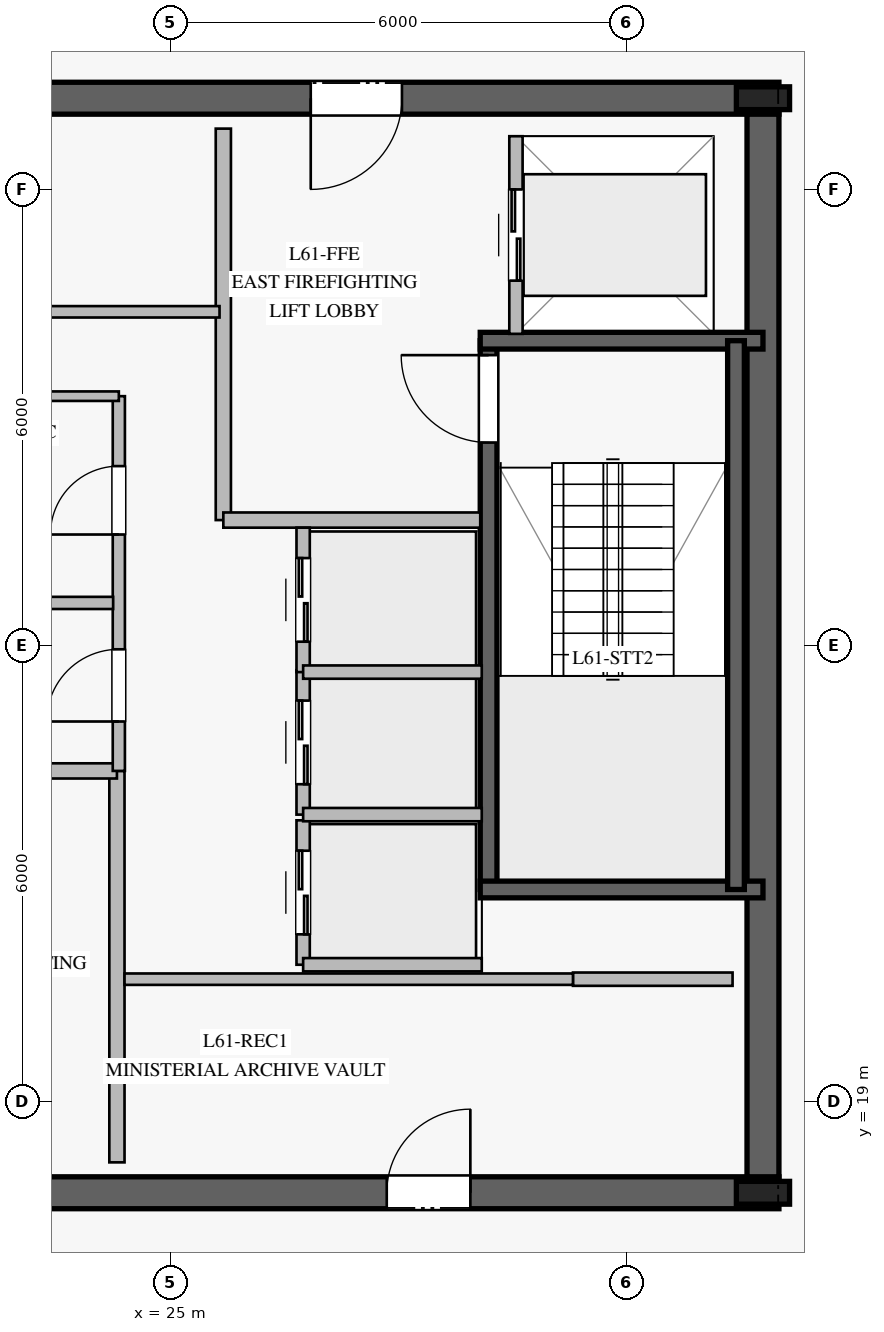
"""IFC4 building model, lengths in metres.
Left out: names, types, materials, properties, quantities, classifications, styles, units other than length and angle.
Written with IfcOpenShell. Run it as: python <this file> out.ifc"""

import sys

from ifc_helpers import new_model, si_unit, direction, frame, frame_2d, origin, origin_2d, place, context, subcontext, project, spatial, rectangle, i_section, extrude, element, fill, save


model = new_model("IFC4")
c1 = context("Model", 3, precision=1e-05, world=origin(), true_north=direction((0.0, 1.0)))
c2 = subcontext(c1, "Body", "Model", "MODEL_VIEW")
j1 = project(units=[si_unit("LENGTHUNIT", "METRE"), si_unit("PLANEANGLEUNIT", "RADIAN")], contexts=[c1])
p1 = place(None, origin())
s1 = spatial("IfcSite", under=j1, at=p1, CompositionType="ELEMENT")
p2 = place(p1, origin())
s2 = spatial("IfcBuilding", under=s1, at=p2, CompositionType="ELEMENT")
p3 = place(p2, frame((0.0, 0.0, 254.2)))
s3 = spatial("IfcBuildingStorey", under=s2, at=p3, CompositionType="ELEMENT", Elevation=254.2)
p4 = place(p3, frame((16.99, 17.8, 0.0), z_axis=(0.0, 0.0, 1.0), x_axis=(1.0, 0.0, 0.0)))
e1 = element("IfcWall", 1, at=p4, inside=s3, PredefinedType="SHEAR", context=c2, shape_type="SweptSolid", body=[
    extrude(rectangle(XDim=16.02, YDim=0.42, at=frame_2d((8.01, 0.0))), origin(), (0.0, 0.0, 1.0), 3.78),
])
p5 = place(p4, frame((4.96, 0.0, 0.0)))
e2 = element("IfcOpeningElement", 2, at=p5, cuts=e1, PredefinedType="OPENING", context=c2, shape_type="SweptSolid", body=[
    extrude(rectangle(XDim=1.2, YDim=2.25, at=frame_2d((0.6, 1.125))), frame((0.0, 0.22, 0.0), z_axis=(0.0, -1.0, 0.0), x_axis=(1.0, 0.0, 0.0)), (0.0, 0.0, 1.0), 0.44),
])
p6 = place(p4, frame((10.86, 0.0, 0.0)))
e3 = element("IfcOpeningElement", 3, at=p6, cuts=e1, PredefinedType="OPENING", context=c2, shape_type="SweptSolid", body=[
    extrude(rectangle(XDim=1.1, YDim=2.2, at=frame_2d((0.55, 1.1))), frame((0.0, 0.22, 0.0), z_axis=(0.0, -1.0, 0.0), x_axis=(1.0, 0.0, 0.0)), (0.0, 0.0, 1.0), 0.44),
])
p7 = place(p3, frame((33.01, 32.2, 0.0), z_axis=(0.0, 0.0, 1.0), x_axis=(-1.0, 0.0, 0.0)))
e4 = element("IfcWall", 4, at=p7, inside=s3, PredefinedType="SHEAR", context=c2, shape_type="SweptSolid", body=[
    extrude(rectangle(XDim=16.02, YDim=0.42, at=frame_2d((8.01, 0.0))), origin(), (0.0, 0.0, 1.0), 3.78),
])
p8 = place(p7, frame((4.96, 0.0, 0.0)))
e5 = element("IfcOpeningElement", 5, at=p8, cuts=e4, PredefinedType="OPENING", context=c2, shape_type="SweptSolid", body=[
    extrude(rectangle(XDim=1.2, YDim=2.25, at=frame_2d((0.6, 1.125))), frame((0.0, 0.22, 0.0), z_axis=(0.0, -1.0, 0.0), x_axis=(1.0, 0.0, 0.0)), (0.0, 0.0, 1.0), 0.44),
])
p9 = place(p7, frame((9.785, 0.0, 0.0)))
e6 = element("IfcOpeningElement", 6, at=p9, cuts=e4, PredefinedType="OPENING", context=c2, shape_type="SweptSolid", body=[
    extrude(rectangle(XDim=1.1, YDim=2.2, at=frame_2d((0.55, 1.1))), frame((0.0, 0.22, 0.0), z_axis=(0.0, -1.0, 0.0), x_axis=(1.0, 0.0, 0.0)), (0.0, 0.0, 1.0), 0.44),
])
p10 = place(p3, frame((32.8, 18.01, 0.0), z_axis=(0.0, 0.0, 1.0), x_axis=(0.0, 1.0, 0.0)))
e7 = element("IfcWall", 7, at=p10, inside=s3, PredefinedType="SHEAR", context=c2, shape_type="SweptSolid", body=[
    extrude(rectangle(XDim=13.98, YDim=0.42, at=frame_2d((6.99, 0.0))), origin(), (0.0, 0.0, 1.0), 3.78),
])
for number, where, z_axis, x_axis in (
    (8, (32.8, 17.8, 0.0), (0.0, 0.0, 1.0), (1.0, 0.0, 0.0)),
    (9, (32.8, 32.2, 0.0), (0.0, 0.0, 1.0), (1.0, 0.0, 0.0)),
):
    element("IfcColumn", number, at=place(p3, frame(where, z_axis=z_axis, x_axis=x_axis)), inside=s3, PredefinedType="COLUMN", context=c2, shape_type="SweptSolid", body=[
        extrude(i_section(OverallWidth=0.3, OverallDepth=0.7, WebThickness=0.017, FlangeThickness=0.032, at=origin_2d()), origin(), (0.0, 0.0, 1.0), 4.0),
    ])
p11 = place(p3, frame((29.19, 21.79, 0.0), z_axis=(0.0, 0.0, 1.0), x_axis=(0.0, 1.0, 0.0)))
e10 = element("IfcWall", 10, at=p11, inside=s3, PredefinedType="SOLIDWALL", context=c2, shape_type="SweptSolid", body=[
    extrude(rectangle(XDim=7.22, YDim=0.22, at=frame_2d((3.61, 0.0))), origin(), (0.0, 0.0, 1.0), 3.78),
])
p12 = place(p11, frame((5.88, 0.0, 0.0)))
e11 = element("IfcOpeningElement", 11, at=p12, cuts=e10, PredefinedType="OPENING", context=c2, shape_type="SweptSolid", body=[
    extrude(rectangle(XDim=1.15, YDim=2.2, at=frame_2d((0.575, 1.1))), frame((0.0, 0.12, 0.0), z_axis=(0.0, -1.0, 0.0), x_axis=(1.0, 0.0, 0.0)), (0.0, 0.0, 1.0), 0.24),
])
for number, where, z_axis, x_axis in (
    (12, (29.08, 21.79, 0.0), (0.0, 0.0, 1.0), (1.0, 0.0, 0.0)),
    (13, (29.08, 29.01, 0.0), (0.0, 0.0, 1.0), (1.0, 0.0, 0.0)),
):
    element("IfcWall", number, at=place(p3, frame(where, z_axis=z_axis, x_axis=x_axis)), inside=s3, PredefinedType="SOLIDWALL", context=c2, shape_type="SweptSolid", body=[
        extrude(rectangle(XDim=3.72, YDim=0.22, at=frame_2d((1.86, 0.0))), origin(), (0.0, 0.0, 1.0), 3.78),
    ])
p13 = place(p3, frame((32.445, 29.01, 0.0), z_axis=(0.0, 0.0, 1.0), x_axis=(0.0, -1.0, 0.0)))
e14 = element("IfcWall", 14, at=p13, inside=s3, PredefinedType="SOLIDWALL", context=c2, shape_type="SweptSolid", body=[
    extrude(rectangle(XDim=7.22, YDim=0.22, at=frame_2d((3.61, 0.0))), origin(), (0.0, 0.0, 1.0), 3.78),
])
p14 = place(p3, frame((24.3, 18.2, 0.0), z_axis=(0.0, 0.0, 1.0), x_axis=(0.0, 1.0, 0.0)))
e15 = element("IfcWall", 15, at=p14, inside=s3, PredefinedType="PARTITIONING", context=c2, shape_type="SweptSolid", body=[
    extrude(rectangle(XDim=5.15, YDim=0.2, at=frame_2d((2.575, 0.0))), origin(), (0.0, 0.0, 1.0), 3.78),
])
p15 = place(p3, frame((20.92, 23.35, 0.0), z_axis=(0.0, 0.0, 1.0), x_axis=(1.0, 0.0, 0.0)))
e16 = element("IfcWall", 16, at=p15, inside=s3, PredefinedType="PARTITIONING", context=c2, shape_type="SweptSolid", body=[
    extrude(rectangle(XDim=3.38, YDim=0.2, at=frame_2d((1.69, 0.0))), origin(), (0.0, 0.0, 1.0), 3.78),
])
p16 = place(p3, frame((25.7, 26.65, 0.0), z_axis=(0.0, 0.0, 1.0), x_axis=(0.0, 1.0, 0.0)))
e17 = element("IfcWall", 17, at=p16, inside=s3, PredefinedType="PARTITIONING", context=c2, shape_type="SweptSolid", body=[
    extrude(rectangle(XDim=5.15, YDim=0.2, at=frame_2d((2.575, 0.0))), origin(), (0.0, 0.0, 1.0), 3.78),
])
p17 = place(p3, frame((25.7, 26.65, 0.0), z_axis=(0.0, 0.0, 1.0), x_axis=(1.0, 0.0, 0.0)))
e18 = element("IfcWall", 18, at=p17, inside=s3, PredefinedType="PARTITIONING", context=c2, shape_type="SweptSolid", body=[
    extrude(rectangle(XDim=3.38, YDim=0.2, at=frame_2d((1.69, 0.0))), origin(), (0.0, 0.0, 1.0), 3.78),
])
p18 = place(p3, frame((24.325, 23.35, 0.0), z_axis=(0.0, 0.0, 1.0), x_axis=(0.0, 1.0, 0.0)))
e19 = element("IfcWall", 19, at=p18, inside=s3, PredefinedType="PLUMBINGWALL", context=c2, shape_type="SweptSolid", body=[
    extrude(rectangle(XDim=4.93, YDim=0.16, at=frame_2d((2.465, 0.0))), origin(), (0.0, 0.0, 1.0), 3.78),
])
p19 = place(p18, frame((0.65, 0.0, 0.0)))
e20 = element("IfcOpeningElement", 20, at=p19, cuts=e19, PredefinedType="OPENING", context=c2, shape_type="SweptSolid", body=[
    extrude(rectangle(XDim=0.95, YDim=2.1, at=frame_2d((0.475, 1.05))), frame((0.0, 0.09, 0.0), z_axis=(0.0, -1.0, 0.0), x_axis=(1.0, 0.0, 0.0)), (0.0, 0.0, 1.0), 0.18),
])
p20 = place(p18, frame((3.11, 0.0, 0.0)))
e21 = element("IfcOpeningElement", 21, at=p20, cuts=e19, PredefinedType="OPENING", context=c2, shape_type="SweptSolid", body=[
    extrude(rectangle(XDim=0.9, YDim=2.1, at=frame_2d((0.45, 1.05))), frame((0.0, 0.09, 0.0), z_axis=(0.0, -1.0, 0.0), x_axis=(1.0, 0.0, 0.0)), (0.0, 0.0, 1.0), 0.18),
])
p21 = place(p3, frame((20.92, 28.28, 0.0), z_axis=(0.0, 0.0, 1.0), x_axis=(1.0, 0.0, 0.0)))
e22 = element("IfcWall", 22, at=p21, inside=s3, PredefinedType="PARTITIONING", context=c2, shape_type="SweptSolid", body=[
    extrude(rectangle(XDim=3.405, YDim=0.125, at=frame_2d((1.703, 0.0))), origin(), (0.0, 0.0, 1.0), 3.78),
])
p22 = place(p21, frame((0.255, 0.0, 0.0)))
e23 = element("IfcOpeningElement", 23, at=p22, cuts=e22, PredefinedType="OPENING", context=c2, shape_type="SweptSolid", body=[
    extrude(rectangle(XDim=1.0, YDim=2.15, at=frame_2d((0.5, 1.075))), frame((0.0, 0.073, 0.0), z_axis=(0.0, -1.0, 0.0), x_axis=(1.0, 0.0, 0.0)), (0.0, 0.0, 1.0), 0.145),
])
p23 = place(p3, frame((20.95, 25.56, 0.0), z_axis=(0.0, 0.0, 1.0), x_axis=(1.0, 0.0, 0.0)))
e24 = element("IfcWall", 24, at=p23, inside=s3, PredefinedType="PLUMBINGWALL", context=c2, shape_type="SweptSolid", body=[
    extrude(rectangle(XDim=3.3, YDim=0.16, at=frame_2d((1.65, 0.0))), origin(), (0.0, 0.0, 1.0), 3.78),
])
p24 = place(p3, frame((30.3, 20.61, 0.0), z_axis=(0.0, 0.0, 1.0), x_axis=(1.0, 0.0, 0.0)))
e25 = element("IfcWall", 25, at=p24, inside=s3, PredefinedType="PARTITIONING", context=c2, shape_type="SweptSolid", body=[
    extrude(rectangle(XDim=2.1, YDim=0.175, at=frame_2d((1.05, 0.0))), origin(), (0.0, 0.0, 1.0), 3.78),
])
p25 = place(p3, frame((24.4, 20.61, 0.0), z_axis=(0.0, 0.0, 1.0), x_axis=(1.0, 0.0, 0.0)))
e26 = element("IfcWall", 26, at=p25, inside=s3, PredefinedType="PARTITIONING", context=c2, shape_type="SweptSolid", body=[
    extrude(rectangle(XDim=5.9, YDim=0.15, at=frame_2d((2.95, 0.0))), origin(), (0.0, 0.0, 1.0), 3.78),
])
p26 = place(p3, frame((19.75, 29.39, 0.0), z_axis=(0.0, 0.0, 1.0), x_axis=(1.0, 0.0, 0.0)))
e27 = element("IfcWall", 27, at=p26, inside=s3, PredefinedType="PARTITIONING", context=c2, shape_type="SweptSolid", body=[
    extrude(rectangle(XDim=5.9, YDim=0.15, at=frame_2d((2.95, 0.0))), origin(), (0.0, 0.0, 1.0), 3.78),
])
p27 = place(p3, frame((26.75, 20.8, 0.0), z_axis=(0.0, 0.0, 1.0), x_axis=(0.0, 1.0, 0.0)))
e28 = element("IfcWall", 28, at=p27, inside=s3, PredefinedType="PARTITIONING", context=c2, shape_type="SweptSolid", body=[
    extrude(rectangle(XDim=1.9, YDim=0.175, at=frame_2d((0.95, 0.0))), origin(), (0.0, 0.0, 1.0), 3.78),
])
p28 = place(p27, frame((0.4, 0.0, 0.0)))
e29 = element("IfcOpeningElement", 29, at=p28, cuts=e28, PredefinedType="OPENING", context=c2, shape_type="SweptSolid", body=[
    extrude(rectangle(XDim=1.1, YDim=2.2, at=frame_2d((0.55, 1.1))), frame((0.0, 0.098, 0.0), z_axis=(0.0, -1.0, 0.0), x_axis=(1.0, 0.0, 0.0)), (0.0, 0.0, 1.0), 0.195),
])
p29 = place(p3, frame((26.75, 20.8, 0.0), z_axis=(0.0, 0.0, 1.0), x_axis=(1.0, 0.0, 0.0)))
e30 = element("IfcWall", 30, at=p29, inside=s3, PredefinedType="PARTITIONING", context=c2, shape_type="SweptSolid", body=[
    extrude(rectangle(XDim=2.35, YDim=0.175, at=frame_2d((1.175, 0.0))), origin(), (0.0, 0.0, 1.0), 3.78),
])
p30 = place(p3, frame((26.75, 22.775, 0.0), z_axis=(0.0, 0.0, 1.0), x_axis=(0.0, 1.0, 0.0)))
e31 = element("IfcWall", 31, at=p30, inside=s3, PredefinedType="PARTITIONING", context=c2, shape_type="SweptSolid", body=[
    extrude(rectangle(XDim=1.9, YDim=0.175, at=frame_2d((0.95, 0.0))), origin(), (0.0, 0.0, 1.0), 3.78),
])
p31 = place(p30, frame((0.4, 0.0, 0.0)))
e32 = element("IfcOpeningElement", 32, at=p31, cuts=e31, PredefinedType="OPENING", context=c2, shape_type="SweptSolid", body=[
    extrude(rectangle(XDim=1.1, YDim=2.2, at=frame_2d((0.55, 1.1))), frame((0.0, 0.098, 0.0), z_axis=(0.0, -1.0, 0.0), x_axis=(1.0, 0.0, 0.0)), (0.0, 0.0, 1.0), 0.195),
])
p32 = place(p3, frame((26.75, 22.775, 0.0), z_axis=(0.0, 0.0, 1.0), x_axis=(1.0, 0.0, 0.0)))
e33 = element("IfcWall", 33, at=p32, inside=s3, PredefinedType="PARTITIONING", context=c2, shape_type="SweptSolid", body=[
    extrude(rectangle(XDim=2.35, YDim=0.175, at=frame_2d((1.175, 0.0))), origin(), (0.0, 0.0, 1.0), 3.78),
])
p33 = place(p3, frame((26.75, 24.65, 0.0), z_axis=(0.0, 0.0, 1.0), x_axis=(0.0, 1.0, 0.0)))
e34 = element("IfcWall", 34, at=p33, inside=s3, PredefinedType="PARTITIONING", context=c2, shape_type="SweptSolid", body=[
    extrude(rectangle(XDim=1.9, YDim=0.175, at=frame_2d((0.95, 0.0))), origin(), (0.0, 0.0, 1.0), 3.78),
])
p34 = place(p33, frame((0.4, 0.0, 0.0)))
e35 = element("IfcOpeningElement", 35, at=p34, cuts=e34, PredefinedType="OPENING", context=c2, shape_type="SweptSolid", body=[
    extrude(rectangle(XDim=1.1, YDim=2.2, at=frame_2d((0.55, 1.1))), frame((0.0, 0.098, 0.0), z_axis=(0.0, -1.0, 0.0), x_axis=(1.0, 0.0, 0.0)), (0.0, 0.0, 1.0), 0.195),
])
p35 = place(p3, frame((26.75, 24.65, 0.0), z_axis=(0.0, 0.0, 1.0), x_axis=(1.0, 0.0, 0.0)))
e36 = element("IfcWall", 36, at=p35, inside=s3, PredefinedType="PARTITIONING", context=c2, shape_type="SweptSolid", body=[
    extrude(rectangle(XDim=2.35, YDim=0.175, at=frame_2d((1.175, 0.0))), origin(), (0.0, 0.0, 1.0), 3.78),
])
p36 = place(p3, frame((29.55, 29.1, 0.0), z_axis=(0.0, 0.0, 1.0), x_axis=(0.0, 1.0, 0.0)))
e37 = element("IfcWall", 37, at=p36, inside=s3, PredefinedType="PARTITIONING", context=c2, shape_type="SweptSolid", body=[
    extrude(rectangle(XDim=2.6, YDim=0.175, at=frame_2d((1.3, 0.0))), origin(), (0.0, 0.0, 1.0), 3.78),
])
p37 = place(p36, frame((0.7, 0.0, 0.0)))
e38 = element("IfcOpeningElement", 38, at=p37, cuts=e37, PredefinedType="OPENING", context=c2, shape_type="SweptSolid", body=[
    extrude(rectangle(XDim=1.2, YDim=2.2, at=frame_2d((0.6, 1.1))), frame((0.0, 0.098, 0.0), z_axis=(0.0, -1.0, 0.0), x_axis=(1.0, 0.0, 0.0)), (0.0, 0.0, 1.0), 0.195),
])
p38 = place(p12, origin())
e39 = element("IfcDoor", 39, at=p38, inside=s3, OperationType="SINGLE_SWING_RIGHT", PredefinedType="DOOR", context=c2, shape_type="SweptSolid", body=[
    extrude(rectangle(XDim=1.15, YDim=2.2, at=frame_2d((0.575, 1.1))), frame((0.0, 0.025, 0.0), z_axis=(0.0, -1.0, 0.0), x_axis=(1.0, 0.0, 0.0)), (0.0, 0.0, 1.0), 0.05),
])
fill(e11, e39)
p39 = place(p8, origin())
e40 = element("IfcDoor", 40, at=p39, inside=s3, OperationType="SINGLE_SWING_RIGHT", PredefinedType="DOOR", context=c2, shape_type="SweptSolid", body=[
    extrude(rectangle(XDim=1.2, YDim=2.25, at=frame_2d((0.6, 1.125))), frame((0.0, 0.025, 0.0), z_axis=(0.0, -1.0, 0.0), x_axis=(1.0, 0.0, 0.0)), (0.0, 0.0, 1.0), 0.05),
])
fill(e5, e40)
p40 = place(p19, origin())
e41 = element("IfcDoor", 41, at=p40, inside=s3, OperationType="SINGLE_SWING_LEFT", PredefinedType="DOOR", context=c2, shape_type="SweptSolid", body=[
    extrude(rectangle(XDim=0.95, YDim=2.1, at=frame_2d((0.475, 1.05))), frame((0.0, 0.025, 0.0), z_axis=(0.0, -1.0, 0.0), x_axis=(1.0, 0.0, 0.0)), (0.0, 0.0, 1.0), 0.05),
])
fill(e20, e41)
p41 = place(p20, origin())
e42 = element("IfcDoor", 42, at=p41, inside=s3, OperationType="SINGLE_SWING_LEFT", PredefinedType="DOOR", context=c2, shape_type="SweptSolid", body=[
    extrude(rectangle(XDim=0.9, YDim=2.1, at=frame_2d((0.45, 1.05))), frame((0.0, 0.025, 0.0), z_axis=(0.0, -1.0, 0.0), x_axis=(1.0, 0.0, 0.0)), (0.0, 0.0, 1.0), 0.05),
])
fill(e21, e42)
p42 = place(p6, origin())
e43 = element("IfcDoor", 43, at=p42, inside=s3, OperationType="SINGLE_SWING_RIGHT", PredefinedType="DOOR", context=c2, shape_type="SweptSolid", body=[
    extrude(rectangle(XDim=1.1, YDim=2.2, at=frame_2d((0.55, 1.1))), frame((0.0, 0.025, 0.0), z_axis=(0.0, -1.0, 0.0), x_axis=(1.0, 0.0, 0.0)), (0.0, 0.0, 1.0), 0.05),
])
fill(e3, e43)
p43 = place(p28, origin())
e44 = element("IfcDoor", 44, at=p43, inside=s3, OperationType="DOUBLE_DOOR_SLIDING", PredefinedType="DOOR", context=c2, shape_type="SweptSolid", body=[
    extrude(rectangle(XDim=1.1, YDim=2.2, at=frame_2d((0.55, 1.1))), frame((0.0, 0.025, 0.0), z_axis=(0.0, -1.0, 0.0), x_axis=(1.0, 0.0, 0.0)), (0.0, 0.0, 1.0), 0.05),
])
fill(e29, e44)
p44 = place(p31, origin())
e45 = element("IfcDoor", 45, at=p44, inside=s3, OperationType="DOUBLE_DOOR_SLIDING", PredefinedType="DOOR", context=c2, shape_type="SweptSolid", body=[
    extrude(rectangle(XDim=1.1, YDim=2.2, at=frame_2d((0.55, 1.1))), frame((0.0, 0.025, 0.0), z_axis=(0.0, -1.0, 0.0), x_axis=(1.0, 0.0, 0.0)), (0.0, 0.0, 1.0), 0.05),
])
fill(e32, e45)
p45 = place(p34, origin())
e46 = element("IfcDoor", 46, at=p45, inside=s3, OperationType="DOUBLE_DOOR_SLIDING", PredefinedType="DOOR", context=c2, shape_type="SweptSolid", body=[
    extrude(rectangle(XDim=1.1, YDim=2.2, at=frame_2d((0.55, 1.1))), frame((0.0, 0.025, 0.0), z_axis=(0.0, -1.0, 0.0), x_axis=(1.0, 0.0, 0.0)), (0.0, 0.0, 1.0), 0.05),
])
fill(e35, e46)
p46 = place(p37, origin())
e47 = element("IfcDoor", 47, at=p46, inside=s3, OperationType="DOUBLE_DOOR_SLIDING", PredefinedType="DOOR", context=c2, shape_type="SweptSolid", body=[
    extrude(rectangle(XDim=1.2, YDim=2.2, at=frame_2d((0.6, 1.1))), frame((0.0, 0.025, 0.0), z_axis=(0.0, -1.0, 0.0), x_axis=(1.0, 0.0, 0.0)), (0.0, 0.0, 1.0), 0.05),
])
fill(e38, e47)
save(model, sys.argv[1])
